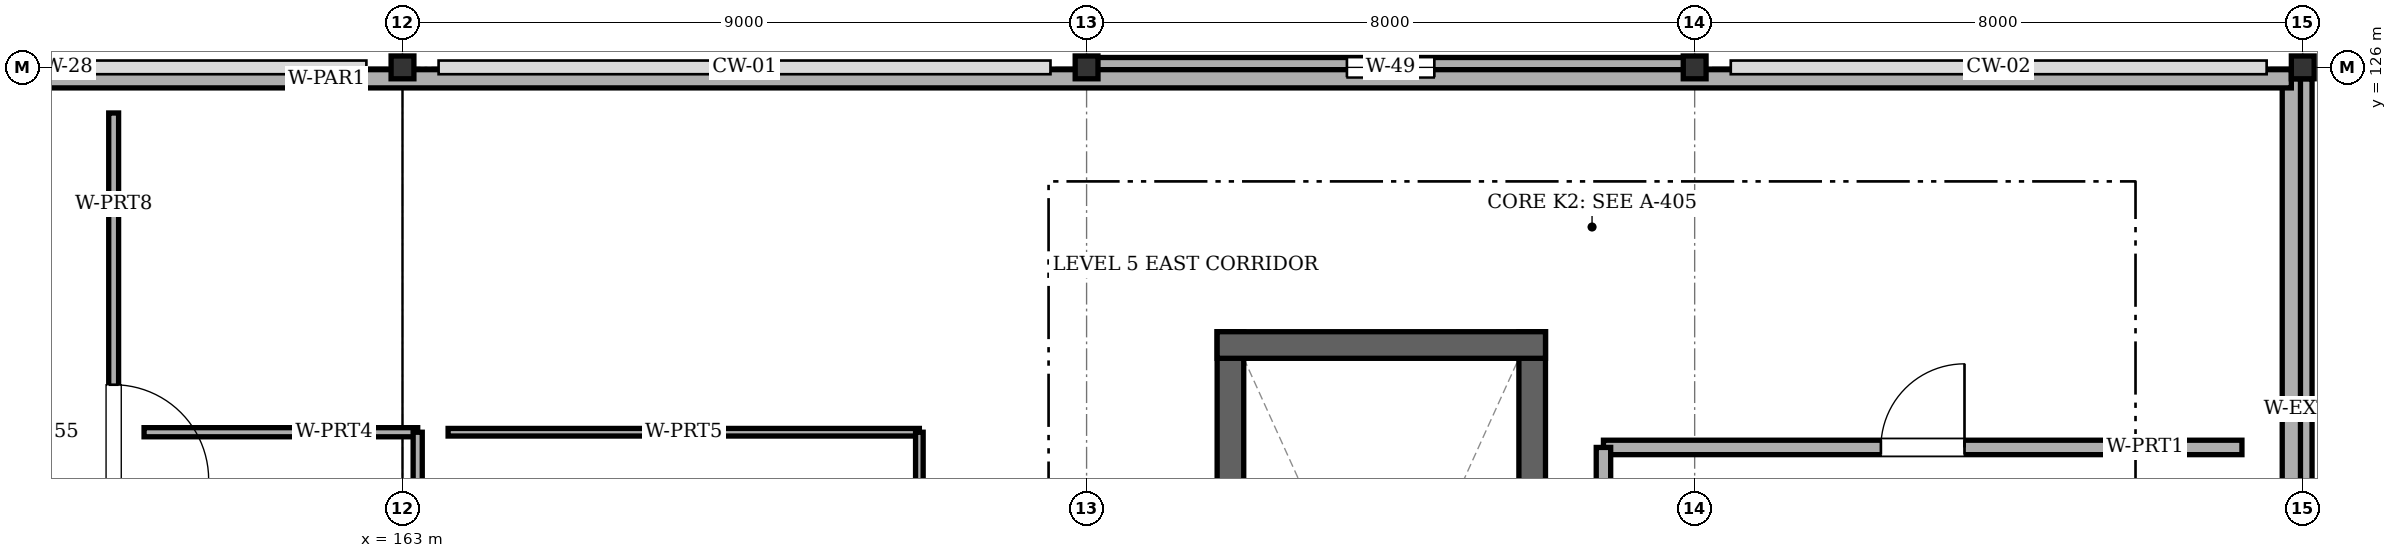
"""IFC4 building model, lengths in metres.
Left out: names, types, materials, properties, quantities, classifications, styles, units other than length and angle.
Written with IfcOpenShell. Run it as: python <this file> out.ifc"""

import sys

from ifc_helpers import new_model, si_unit, direction, frame, frame_2d, origin, origin_2d, place, context, subcontext, project, spatial, rectangle, i_section, extrude, element, fill, save


model = new_model("IFC4")
c1 = context("Model", 3, precision=1e-05, world=origin(), true_north=direction((0.0, 1.0)))
c2 = subcontext(c1, "Body", "Model", "MODEL_VIEW")
j1 = project(units=[si_unit("LENGTHUNIT", "METRE"), si_unit("PLANEANGLEUNIT", "RADIAN")], contexts=[c1])
p1 = place(None, origin())
s1 = spatial("IfcSite", under=j1, at=p1, CompositionType="ELEMENT")
p2 = place(p1, origin())
s2 = spatial("IfcBuilding", under=s1, at=p2, CompositionType="ELEMENT")
p3 = place(p2, frame((0.0, 0.0, 20.8)))
s3 = spatial("IfcBuildingStorey", under=s2, at=p3, CompositionType="ELEMENT", Elevation=20.8)
for number, where, z_axis, x_axis in (
    (1, (163.0, 126.0, 0.0), (0.0, 0.0, 1.0), (1.0, 0.0, 0.0)),
    (2, (172.0, 126.0, 0.0), (0.0, 0.0, 1.0), (1.0, 0.0, 0.0)),
    (3, (180.0, 126.0, 0.0), (0.0, 0.0, 1.0), (1.0, 0.0, 0.0)),
    (4, (188.0, 126.0, 0.0), (0.0, 0.0, 1.0), (1.0, 0.0, 0.0)),
):
    element("IfcColumn", number, at=place(p3, frame(where, z_axis=z_axis, x_axis=x_axis)), inside=s3, PredefinedType="COLUMN", context=c2, shape_type="SweptSolid", body=[
        extrude(i_section(OverallWidth=0.3, OverallDepth=0.3, WebThickness=0.01, FlangeThickness=0.015, FilletRadius=0.018, at=origin_2d()), origin(), (0.0, 0.0, 1.0), 2.85),
    ])
p4 = place(p3, frame((172.005, 126.0, 0.0), z_axis=(0.0, 0.0, 1.0), x_axis=(1.0, 0.0, 0.0)))
e5 = element("IfcWall", 5, at=p4, inside=s3, PredefinedType="SOLIDWALL", context=c2, shape_type="SweptSolid", body=[
    extrude(rectangle(XDim=7.99, YDim=0.26, at=frame_2d((3.995, 0.0))), origin(), (0.0, 0.0, 1.0), 2.23),
])
p5 = place(p4, frame((3.42, 0.0, 0.7)))
e6 = element("IfcOpeningElement", 6, at=p5, cuts=e5, PredefinedType="OPENING", context=c2, shape_type="SweptSolid", body=[
    extrude(rectangle(XDim=1.15, YDim=1.45, at=frame_2d((0.575, 0.725))), frame((0.0, 0.14, 0.0), z_axis=(0.0, -1.0, 0.0), x_axis=(1.0, 0.0, 0.0)), (0.0, 0.0, 1.0), 0.28),
])
p6 = place(p3, frame((188.0, 125.85, 0.0), z_axis=(0.0, 0.0, 1.0), x_axis=(0.0, -1.0, 0.0)))
e7 = element("IfcWall", 7, at=p6, inside=s3, PredefinedType="SOLIDWALL", context=c2, shape_type="SweptSolid", body=[
    extrude(rectangle(XDim=8.7, YDim=0.245, at=frame_2d((4.35, 0.0))), origin(), (0.0, 0.0, 1.0), 2.18),
])
p7 = place(p3, frame((187.85, 76.65, 2.85), z_axis=(0.0, 0.0, 1.0), x_axis=(0.0, 1.0, 0.0)))
e8 = element("IfcWall", 8, at=p7, inside=s3, PredefinedType="PARAPET", context=c2, shape_type="SweptSolid", body=[
    extrude(rectangle(XDim=49.2, YDim=0.24, at=frame_2d((24.6, 0.0))), origin(), (0.0, 0.0, 1.0), 0.34),
])
p8 = place(p3, frame((187.85, 125.85, 2.85), z_axis=(0.0, 0.0, 1.0), x_axis=(-1.0, 0.0, 0.0)))
e9 = element("IfcWall", 9, at=p8, inside=s3, PredefinedType="PARAPET", context=c2, shape_type="SweptSolid", body=[
    extrude(rectangle(XDim=51.7, YDim=0.24, at=frame_2d((25.85, 0.0))), origin(), (0.0, 0.0, 1.0), 0.34),
])
for number, where, z_axis, x_axis in (
    (10, (177.863, 112.025, 0.0), (0.0, 0.0, 1.0), (0.0, 1.0, 0.0)),
    (11, (173.893, 122.522, 0.0), (0.0, 0.0, 1.0), (0.0, -1.0, 0.0)),
):
    element("IfcWall", number, at=place(p3, frame(where, z_axis=z_axis, x_axis=x_axis)), inside=s3, PredefinedType="SHEAR", context=c2, shape_type="SweptSolid", body=[
        extrude(rectangle(XDim=10.498, YDim=0.35, at=frame_2d((5.249, 0.0))), origin(), (0.0, 0.0, 1.0), 2.645),
    ])
p9 = place(p3, frame((178.038, 122.347, 0.0), z_axis=(0.0, 0.0, 1.0), x_axis=(-1.0, 0.0, 0.0)))
e12 = element("IfcWall", 12, at=p9, inside=s3, PredefinedType="SHEAR", context=c2, shape_type="SweptSolid", body=[
    extrude(rectangle(XDim=4.32, YDim=0.35, at=frame_2d((2.16, 0.0))), origin(), (0.0, 0.0, 1.0), 2.645),
])
p10 = place(p3, frame((159.2, 125.4, 0.0), z_axis=(0.0, 0.0, 1.0), x_axis=(0.0, -1.0, 0.0)))
e13 = element("IfcWall", 13, at=p10, inside=s3, PredefinedType="PARTITIONING", context=c2, shape_type="SweptSolid", body=[
    extrude(rectangle(XDim=8.4, YDim=0.13, at=frame_2d((4.2, 0.0))), origin(), (0.0, 0.0, 1.0), 2.22),
])
p11 = place(p10, frame((3.575, 0.0, 0.0)))
e14 = element("IfcOpeningElement", 14, at=p11, cuts=e13, PredefinedType="OPENING", context=c2, shape_type="SweptSolid", body=[
    extrude(rectangle(XDim=1.25, YDim=2.1, at=frame_2d((0.625, 1.05))), frame((0.0, 0.075, 0.0), z_axis=(0.0, -1.0, 0.0), x_axis=(1.0, 0.0, 0.0)), (0.0, 0.0, 1.0), 0.15),
])
p12 = place(p3, frame((159.6, 121.2, 0.0), z_axis=(0.0, 0.0, 1.0), x_axis=(1.0, 0.0, 0.0)))
e15 = element("IfcWall", 15, at=p12, inside=s3, PredefinedType="PARTITIONING", context=c2, shape_type="SweptSolid", body=[
    extrude(rectangle(XDim=3.6, YDim=0.12, at=frame_2d((1.8, 0.0))), origin(), (0.0, 0.0, 1.0), 2.23),
])
p13 = place(p3, frame((163.2, 121.2, 0.0), z_axis=(0.0, 0.0, 1.0), x_axis=(0.0, -1.0, 0.0)))
e16 = element("IfcWall", 16, at=p13, inside=s3, PredefinedType="PARTITIONING", context=c2, shape_type="SweptSolid", body=[
    extrude(rectangle(XDim=14.4, YDim=0.12, at=frame_2d((7.2, 0.0))), origin(), (0.0, 0.0, 1.0), 2.18),
])
p14 = place(p3, frame((163.6, 121.2, 0.0), z_axis=(0.0, 0.0, 1.0), x_axis=(1.0, 0.0, 0.0)))
e17 = element("IfcWall", 17, at=p14, inside=s3, PredefinedType="PARTITIONING", context=c2, shape_type="SweptSolid", body=[
    extrude(rectangle(XDim=6.2, YDim=0.1, at=frame_2d((3.1, 0.0))), origin(), (0.0, 0.0, 1.0), 2.23),
])
p15 = place(p3, frame((169.8, 121.2, 0.0), z_axis=(0.0, 0.0, 1.0), x_axis=(0.0, -1.0, 0.0)))
e18 = element("IfcWall", 18, at=p15, inside=s3, PredefinedType="PARTITIONING", context=c2, shape_type="SweptSolid", body=[
    extrude(rectangle(XDim=14.4, YDim=0.1, at=frame_2d((7.2, 0.0))), origin(), (0.0, 0.0, 1.0), 2.23),
])
p16 = place(p15, frame((6.575, 0.0, 0.0)))
e19 = element("IfcOpeningElement", 19, at=p16, cuts=e18, PredefinedType="OPENING", context=c2, shape_type="SweptSolid", body=[
    extrude(rectangle(XDim=1.25, YDim=2.1, at=frame_2d((0.625, 1.05))), frame((0.0, 0.06, 0.0), z_axis=(0.0, -1.0, 0.0), x_axis=(1.0, 0.0, 0.0)), (0.0, 0.0, 1.0), 0.12),
])
p17 = place(p15, frame((10.944, 0.0, 0.0)))
e20 = element("IfcOpeningElement", 20, at=p17, cuts=e18, PredefinedType="OPENING", context=c2, shape_type="SweptSolid", body=[
    extrude(rectangle(XDim=1.25, YDim=2.1, at=frame_2d((0.625, 1.05))), frame((0.0, 0.06, 0.0), z_axis=(0.0, -1.0, 0.0), x_axis=(1.0, 0.0, 0.0)), (0.0, 0.0, 1.0), 0.12),
])
p18 = place(p3, frame((178.8, 121.0, 0.0), z_axis=(0.0, 0.0, 1.0), x_axis=(1.0, 0.0, 0.0)))
e21 = element("IfcWall", 21, at=p18, inside=s3, PredefinedType="PARTITIONING", context=c2, shape_type="SweptSolid", body=[
    extrude(rectangle(XDim=8.4, YDim=0.19, at=frame_2d((4.2, 0.0))), origin(), (0.0, 0.0, 1.0), 2.23),
])
p19 = place(p18, frame((3.65, 0.0, 0.0)))
e22 = element("IfcOpeningElement", 22, at=p19, cuts=e21, PredefinedType="OPENING", context=c2, shape_type="SweptSolid", body=[
    extrude(rectangle(XDim=1.1, YDim=2.1, at=frame_2d((0.55, 1.05))), frame((0.0, 0.105, 0.0), z_axis=(0.0, -1.0, 0.0), x_axis=(1.0, 0.0, 0.0)), (0.0, 0.0, 1.0), 0.21),
])
p20 = place(p3, frame((178.8, 108.2, 0.0), z_axis=(0.0, 0.0, 1.0), x_axis=(0.0, 1.0, 0.0)))
e23 = element("IfcWall", 23, at=p20, inside=s3, PredefinedType="PARTITIONING", context=c2, shape_type="SweptSolid", body=[
    extrude(rectangle(XDim=12.8, YDim=0.19, at=frame_2d((6.4, 0.0))), origin(), (0.0, 0.0, 1.0), 2.23),
])
p21 = place(p5, origin())
e24 = element("IfcWindow", 24, at=p21, inside=s3, PartitioningType="SINGLE_PANEL", PredefinedType="WINDOW", context=c2, shape_type="SweptSolid", body=[
    extrude(rectangle(XDim=1.15, YDim=1.45, at=frame_2d((0.575, 0.725))), frame((0.0, 0.03, 0.0), z_axis=(0.0, -1.0, 0.0), x_axis=(1.0, 0.0, 0.0)), (0.0, 0.0, 1.0), 0.06),
])
fill(e6, e24)
p22 = place(p11, origin())
e25 = element("IfcDoor", 25, at=p22, inside=s3, OperationType="SINGLE_SWING_RIGHT", PredefinedType="DOOR", context=c2, shape_type="SweptSolid", body=[
    extrude(rectangle(XDim=1.25, YDim=2.1, at=frame_2d((0.625, 1.05))), frame((0.0, 0.025, 0.0), z_axis=(0.0, -1.0, 0.0), x_axis=(1.0, 0.0, 0.0)), (0.0, 0.0, 1.0), 0.05),
])
fill(e14, e25)
p23 = place(p19, origin())
e26 = element("IfcDoor", 26, at=p23, inside=s3, OperationType="SINGLE_SWING_RIGHT", PredefinedType="DOOR", context=c2, shape_type="SweptSolid", body=[
    extrude(rectangle(XDim=1.1, YDim=2.1, at=frame_2d((0.55, 1.05))), frame((0.0, 0.025, 0.0), z_axis=(0.0, -1.0, 0.0), x_axis=(1.0, 0.0, 0.0)), (0.0, 0.0, 1.0), 0.05),
])
fill(e22, e26)
save(model, sys.argv[1])
